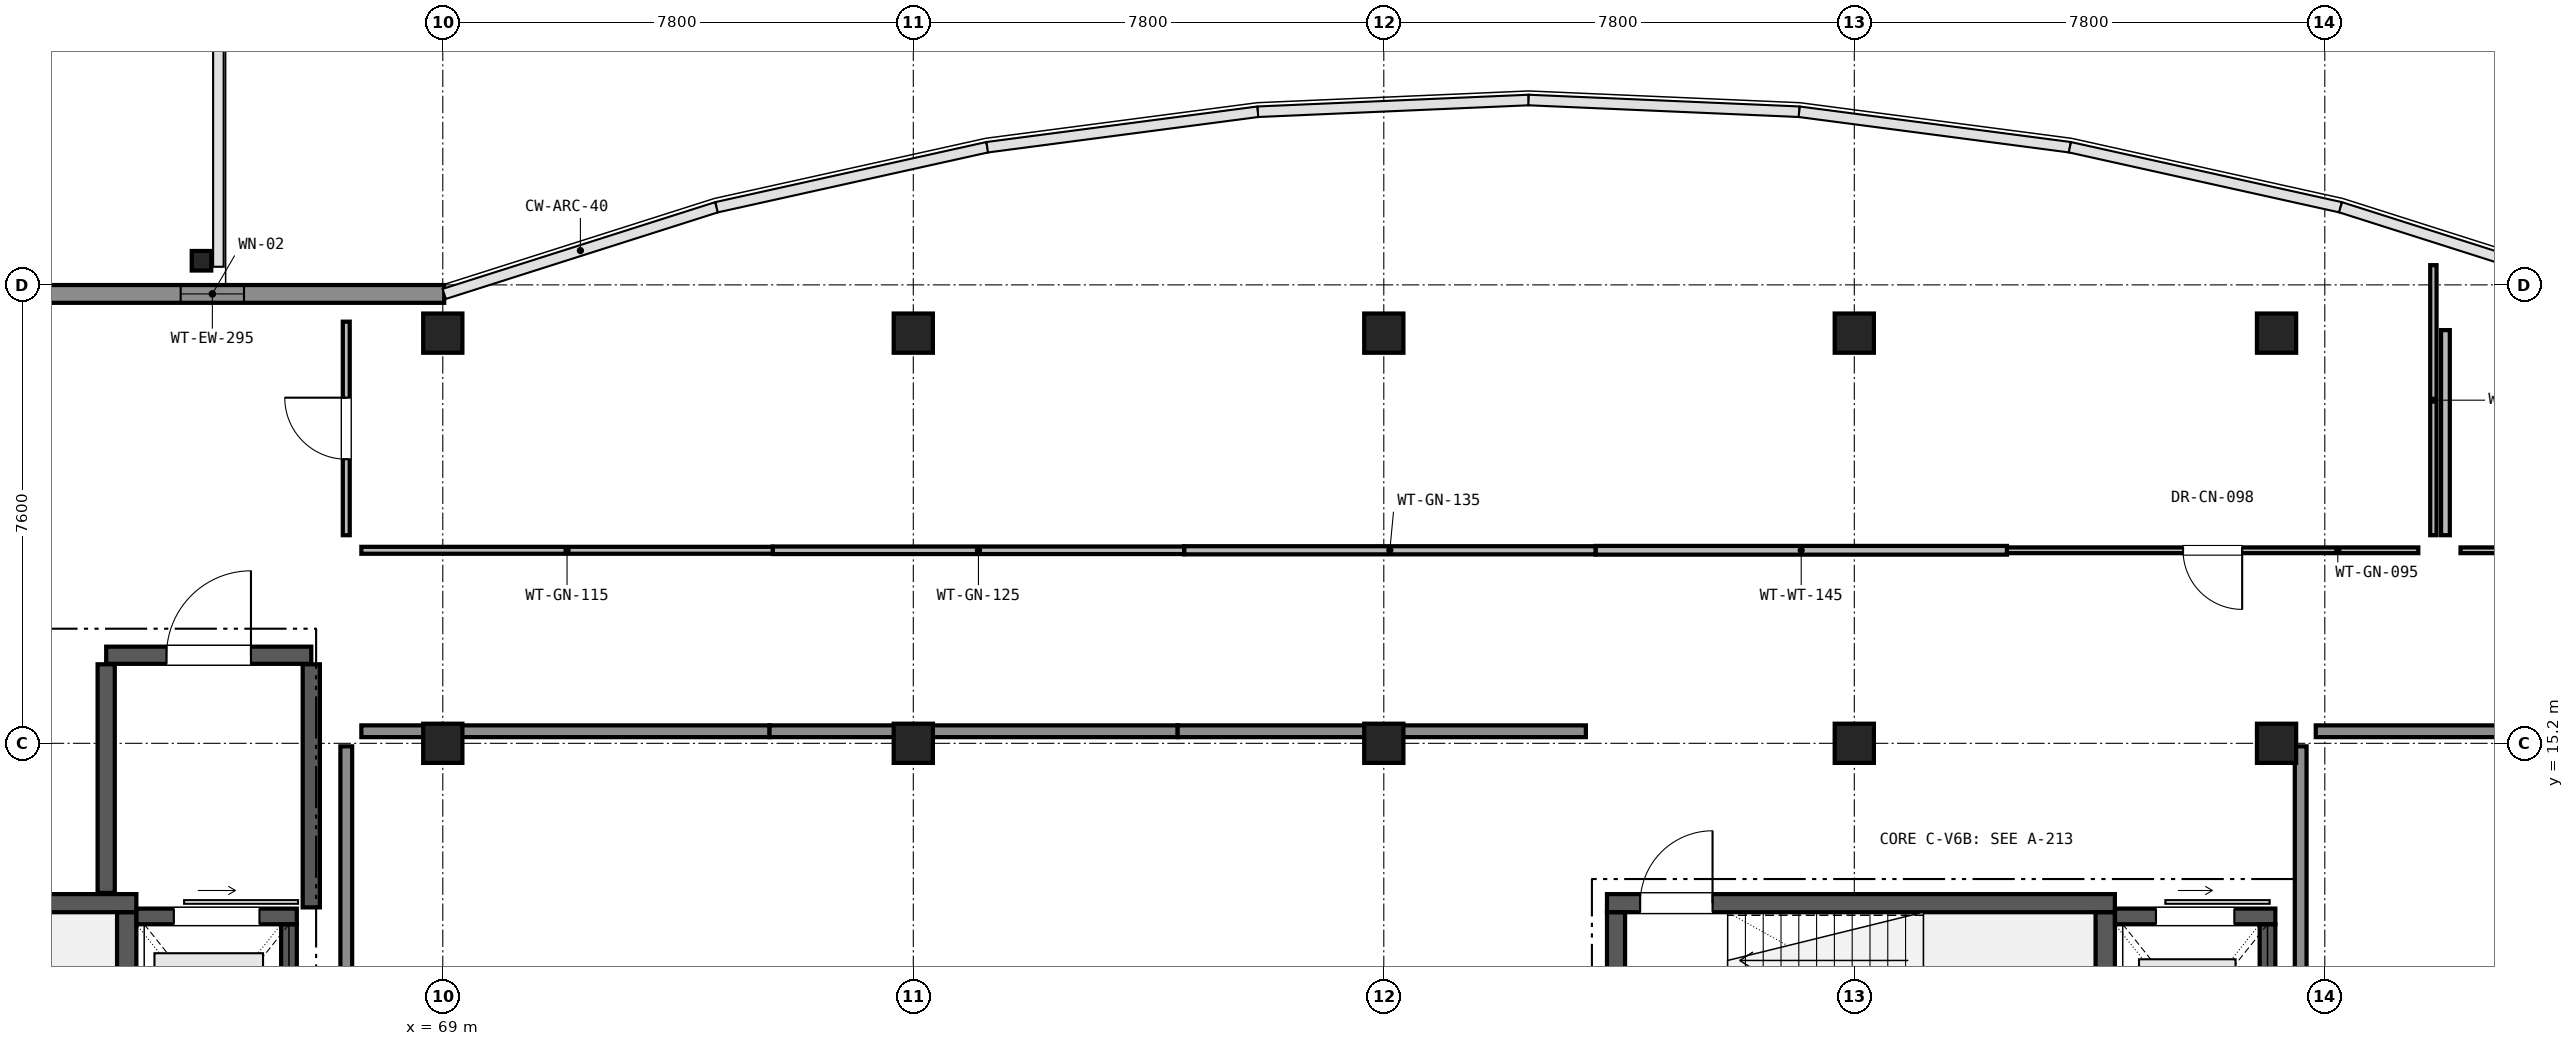
"""IFC4 building model, lengths in metres.
Left out: names, types, materials, properties, quantities, classifications, styles, units other than length and angle.
Written with IfcOpenShell. Run it as: python <this file> out.ifc"""

import sys

from ifc_helpers import new_model, si_unit, direction, frame, frame_2d, origin, origin_2d, place, context, subcontext, project, spatial, rectangle, hollow_circle, extrude, element, fill, save


model = new_model("IFC4")
c1 = context("Model", 3, precision=1e-05, world=origin(), true_north=direction((0.0, 1.0)))
c2 = subcontext(c1, "Body", "Model", "MODEL_VIEW")
j1 = project(units=[si_unit("LENGTHUNIT", "METRE"), si_unit("PLANEANGLEUNIT", "RADIAN")], contexts=[c1])
p1 = place(None, origin())
s1 = spatial("IfcSite", under=j1, at=p1, CompositionType="ELEMENT")
p2 = place(p1, origin())
s2 = spatial("IfcBuilding", under=s1, at=p2, CompositionType="ELEMENT")
p3 = place(p2, frame((0.0, 0.0, 9.52)))
s3 = spatial("IfcBuildingStorey", under=s2, at=p3, CompositionType="ELEMENT", Elevation=9.52)
for number, where, z_axis, x_axis in (
    (1, (69.0, 15.2, 0.0), (0.0, 0.0, 1.0), (1.0, 0.0, 0.0)),
    (2, (69.0, 22.0, 0.0), (0.0, 0.0, 1.0), (1.0, 0.0, 0.0)),
    (3, (76.8, 15.2, 0.0), (0.0, 0.0, 1.0), (1.0, 0.0, 0.0)),
    (4, (76.8, 22.0, 0.0), (0.0, 0.0, 1.0), (1.0, 0.0, 0.0)),
    (5, (84.6, 15.2, 0.0), (0.0, 0.0, 1.0), (1.0, 0.0, 0.0)),
    (6, (84.6, 22.0, 0.0), (0.0, 0.0, 1.0), (1.0, 0.0, 0.0)),
    (7, (92.4, 15.2, 0.0), (0.0, 0.0, 1.0), (1.0, 0.0, 0.0)),
    (8, (92.4, 22.0, 0.0), (0.0, 0.0, 1.0), (1.0, 0.0, 0.0)),
    (9, (99.4, 15.2, 0.0), (0.0, 0.0, 1.0), (1.0, 0.0, 0.0)),
    (10, (99.4, 22.0, 0.0), (0.0, 0.0, 1.0), (1.0, 0.0, 0.0)),
):
    element("IfcColumn", number, at=place(p3, frame(where, z_axis=z_axis, x_axis=x_axis)), inside=s3, PredefinedType="COLUMN", context=c2, shape_type="SweptSolid", body=[
        extrude(rectangle(XDim=0.65, YDim=0.65, at=origin_2d()), origin(), (0.0, 0.0, 1.0), 4.08),
    ])
p4 = place(p3, frame((65.0, 23.2, 0.0), z_axis=(0.0, 0.0, 1.0), x_axis=(1.0, 0.0, 0.0)))
e11 = element("IfcColumn", 11, at=p4, inside=s3, PredefinedType="COLUMN", context=c2, shape_type="SweptSolid", body=[
    extrude(hollow_circle(Radius=0.162, WallThickness=0.012, at=origin_2d()), origin(), (0.0, 0.0, 1.0), 4.08),
])
p5 = place(p3, frame((61.337, 22.65, 0.0), z_axis=(0.0, 0.0, 1.0), x_axis=(1.0, 0.0, 0.0)))
e12 = element("IfcWall", 12, at=p5, inside=s3, PredefinedType="SOLIDWALL", context=c2, shape_type="SweptSolid", body=[
    extrude(rectangle(XDim=7.687, YDim=0.295, at=frame_2d((3.843, 0.0))), origin(), (0.0, 0.0, 1.0), 3.78),
])
p6 = place(p5, frame((3.318, 0.0, 0.9)))
e13 = element("IfcOpeningElement", 13, at=p6, cuts=e12, PredefinedType="OPENING", context=c2, shape_type="SweptSolid", body=[
    extrude(rectangle(XDim=1.05, YDim=1.5, at=frame_2d((0.525, 0.75))), frame((0.0, 0.157, 0.0), z_axis=(0.0, -1.0, 0.0), x_axis=(1.0, 0.0, 0.0)), (0.0, 0.0, 1.0), 0.315),
])
p7 = place(p3, frame((55.5, 12.55, 0.0), z_axis=(0.0, 0.0, 1.0), x_axis=(1.0, 0.0, 0.0)))
e14 = element("IfcWall", 14, at=p7, inside=s3, PredefinedType="SHEAR", context=c2, shape_type="SweptSolid", body=[
    extrude(rectangle(XDim=8.42, YDim=0.3, at=frame_2d((4.21, 0.0))), origin(), (0.0, 0.0, 1.0), 3.78),
])
p8 = place(p7, frame((0.55, 0.0, 0.0)))
e15 = element("IfcOpeningElement", 15, at=p8, cuts=e14, PredefinedType="OPENING", context=c2, shape_type="SweptSolid", body=[
    extrude(rectangle(XDim=1.2, YDim=2.2, at=frame_2d((0.6, 1.1))), frame((0.0, 0.16, 0.0), z_axis=(0.0, -1.0, 0.0), x_axis=(1.0, 0.0, 0.0)), (0.0, 0.0, 1.0), 0.32),
])
p9 = place(p3, frame((63.76, 9.002, 0.0), z_axis=(0.0, 0.0, 1.0), x_axis=(0.0, 1.0, 0.0)))
e16 = element("IfcWall", 16, at=p9, inside=s3, PredefinedType="SHEAR", context=c2, shape_type="SweptSolid", body=[
    extrude(rectangle(XDim=3.396, YDim=0.32, at=frame_2d((1.698, 0.0))), origin(), (0.0, 0.0, 1.0), 3.78),
])
p10 = place(p3, frame((63.922, 12.33, 0.0), z_axis=(0.0, 0.0, 1.0), x_axis=(1.0, 0.0, 0.0)))
e17 = element("IfcWall", 17, at=p10, inside=s3, PredefinedType="SHEAR", context=c2, shape_type="SweptSolid", body=[
    extrude(rectangle(XDim=2.658, YDim=0.26, at=frame_2d((1.329, 0.0))), origin(), (0.0, 0.0, 1.0), 3.78),
])
p11 = place(p10, frame((0.619, 0.0, 0.0)))
e18 = element("IfcOpeningElement", 18, at=p11, cuts=e17, PredefinedType="OPENING", context=c2, shape_type="SweptSolid", body=[
    extrude(rectangle(XDim=1.42, YDim=2.25, at=frame_2d((0.71, 1.125))), frame((0.0, 0.14, 0.0), z_axis=(0.0, -1.0, 0.0), x_axis=(1.0, 0.0, 0.0)), (0.0, 0.0, 1.0), 0.28),
])
p12 = place(p3, frame((66.45, 9.202, 0.0), z_axis=(0.0, 0.0, 1.0), x_axis=(0.0, 1.0, 0.0)))
e19 = element("IfcWall", 19, at=p12, inside=s3, PredefinedType="SHEAR", context=c2, shape_type="SweptSolid", body=[
    extrude(rectangle(XDim=2.996, YDim=0.26, at=frame_2d((1.498, 0.0))), origin(), (0.0, 0.0, 1.0), 3.78),
])
p13 = place(p3, frame((63.42, 16.66, 0.0), z_axis=(0.0, 0.0, 1.0), x_axis=(1.0, 0.0, 0.0)))
e20 = element("IfcWall", 20, at=p13, inside=s3, PredefinedType="SHEAR", context=c2, shape_type="SweptSolid", body=[
    extrude(rectangle(XDim=3.4, YDim=0.285, at=frame_2d((1.7, 0.0))), origin(), (0.0, 0.0, 1.0), 3.78),
])
p14 = place(p13, frame((1.0, 0.0, 0.0)))
e21 = element("IfcOpeningElement", 21, at=p14, cuts=e20, PredefinedType="OPENING", context=c2, shape_type="SweptSolid", body=[
    extrude(rectangle(XDim=1.4, YDim=2.25, at=frame_2d((0.7, 1.125))), frame((0.0, 0.152, 0.0), z_axis=(0.0, -1.0, 0.0), x_axis=(1.0, 0.0, 0.0)), (0.0, 0.0, 1.0), 0.305),
])
p15 = place(p3, frame((63.42, 12.72, 0.0), z_axis=(0.0, 0.0, 1.0), x_axis=(0.0, 1.0, 0.0)))
e22 = element("IfcWall", 22, at=p15, inside=s3, PredefinedType="SHEAR", context=c2, shape_type="SweptSolid", body=[
    extrude(rectangle(XDim=3.79, YDim=0.285, at=frame_2d((1.895, 0.0))), origin(), (0.0, 0.0, 1.0), 3.03),
])
p16 = place(p3, frame((66.82, 12.48, 0.0), z_axis=(0.0, 0.0, 1.0), x_axis=(0.0, 1.0, 0.0)))
e23 = element("IfcWall", 23, at=p16, inside=s3, PredefinedType="SHEAR", context=c2, shape_type="SweptSolid", body=[
    extrude(rectangle(XDim=4.03, YDim=0.285, at=frame_2d((2.015, 0.0))), origin(), (0.0, 0.0, 1.0), 3.03),
])
p17 = place(p3, frame((88.3, 12.55, 0.0), z_axis=(0.0, 0.0, 1.0), x_axis=(1.0, 0.0, 0.0)))
e24 = element("IfcWall", 24, at=p17, inside=s3, PredefinedType="SHEAR", context=c2, shape_type="SweptSolid", body=[
    extrude(rectangle(XDim=8.42, YDim=0.3, at=frame_2d((4.21, 0.0))), origin(), (0.0, 0.0, 1.0), 3.78),
])
p18 = place(p17, frame((0.55, 0.0, 0.0)))
e25 = element("IfcOpeningElement", 25, at=p18, cuts=e24, PredefinedType="OPENING", context=c2, shape_type="SweptSolid", body=[
    extrude(rectangle(XDim=1.2, YDim=2.2, at=frame_2d((0.6, 1.1))), frame((0.0, 0.16, 0.0), z_axis=(0.0, -1.0, 0.0), x_axis=(1.0, 0.0, 0.0)), (0.0, 0.0, 1.0), 0.32),
])
p19 = place(p3, frame((88.45, 9.002, 0.0), z_axis=(0.0, 0.0, 1.0), x_axis=(0.0, 1.0, 0.0)))
e26 = element("IfcWall", 26, at=p19, inside=s3, PredefinedType="SHEAR", context=c2, shape_type="SweptSolid", body=[
    extrude(rectangle(XDim=3.396, YDim=0.3, at=frame_2d((1.698, 0.0))), origin(), (0.0, 0.0, 1.0), 3.78),
])
p20 = place(p3, frame((96.56, 9.002, 0.0), z_axis=(0.0, 0.0, 1.0), x_axis=(0.0, 1.0, 0.0)))
e27 = element("IfcWall", 27, at=p20, inside=s3, PredefinedType="SHEAR", context=c2, shape_type="SweptSolid", body=[
    extrude(rectangle(XDim=3.396, YDim=0.32, at=frame_2d((1.698, 0.0))), origin(), (0.0, 0.0, 1.0), 3.78),
])
p21 = place(p3, frame((96.722, 12.33, 0.0), z_axis=(0.0, 0.0, 1.0), x_axis=(1.0, 0.0, 0.0)))
e28 = element("IfcWall", 28, at=p21, inside=s3, PredefinedType="SHEAR", context=c2, shape_type="SweptSolid", body=[
    extrude(rectangle(XDim=2.658, YDim=0.26, at=frame_2d((1.329, 0.0))), origin(), (0.0, 0.0, 1.0), 3.78),
])
p22 = place(p21, frame((0.679, 0.0, 0.0)))
e29 = element("IfcOpeningElement", 29, at=p22, cuts=e28, PredefinedType="OPENING", context=c2, shape_type="SweptSolid", body=[
    extrude(rectangle(XDim=1.3, YDim=2.2, at=frame_2d((0.65, 1.1))), frame((0.0, 0.14, 0.0), z_axis=(0.0, -1.0, 0.0), x_axis=(1.0, 0.0, 0.0)), (0.0, 0.0, 1.0), 0.28),
])
p23 = place(p3, frame((99.25, 9.202, 0.0), z_axis=(0.0, 0.0, 1.0), x_axis=(0.0, 1.0, 0.0)))
e30 = element("IfcWall", 30, at=p23, inside=s3, PredefinedType="SHEAR", context=c2, shape_type="SweptSolid", body=[
    extrude(rectangle(XDim=2.996, YDim=0.26, at=frame_2d((1.498, 0.0))), origin(), (0.0, 0.0, 1.0), 3.78),
])
p24 = place(p3, frame((67.4, 8.0, 0.0), z_axis=(0.0, 0.0, 1.0), x_axis=(0.0, 1.0, 0.0)))
e31 = element("IfcWall", 31, at=p24, inside=s3, PredefinedType="PARTITIONING", context=c2, shape_type="SweptSolid", body=[
    extrude(rectangle(XDim=7.15, YDim=0.195, at=frame_2d((3.575, 0.0))), origin(), (0.0, 0.0, 1.0), 3.03),
])
p25 = place(p3, frame((67.65, 15.4, 0.0), z_axis=(0.0, 0.0, 1.0), x_axis=(1.0, 0.0, 0.0)))
e32 = element("IfcWall", 32, at=p25, inside=s3, PredefinedType="PARTITIONING", context=c2, shape_type="SweptSolid", body=[
    extrude(rectangle(XDim=6.767, YDim=0.195, at=frame_2d((3.384, 0.0))), origin(), (0.0, 0.0, 1.0), 2.98),
])
p26 = place(p3, frame((74.417, 15.4, 0.0), z_axis=(0.0, 0.0, 1.0), x_axis=(1.0, 0.0, 0.0)))
e33 = element("IfcWall", 33, at=p26, inside=s3, PredefinedType="PARTITIONING", context=c2, shape_type="SweptSolid", body=[
    extrude(rectangle(XDim=6.766, YDim=0.195, at=frame_2d((3.383, 0.0))), origin(), (0.0, 0.0, 1.0), 2.98),
])
p27 = place(p3, frame((81.183, 15.4, 0.0), z_axis=(0.0, 0.0, 1.0), x_axis=(1.0, 0.0, 0.0)))
e34 = element("IfcWall", 34, at=p27, inside=s3, PredefinedType="PARTITIONING", context=c2, shape_type="SweptSolid", body=[
    extrude(rectangle(XDim=6.767, YDim=0.195, at=frame_2d((3.383, 0.0))), origin(), (0.0, 0.0, 1.0), 3.03),
])
p28 = place(p3, frame((100.05, 15.4, 0.0), z_axis=(0.0, 0.0, 1.0), x_axis=(1.0, 0.0, 0.0)))
e35 = element("IfcWall", 35, at=p28, inside=s3, PredefinedType="PARTITIONING", context=c2, shape_type="SweptSolid", body=[
    extrude(rectangle(XDim=7.45, YDim=0.195, at=frame_2d((3.725, 0.0))), origin(), (0.0, 0.0, 1.0), 2.98),
])
p29 = place(p28, frame((3.0, 0.0, 0.0)))
e36 = element("IfcOpeningElement", 36, at=p29, cuts=e35, PredefinedType="OPENING", context=c2, shape_type="SweptSolid", body=[
    extrude(rectangle(XDim=1.45, YDim=2.25, at=frame_2d((0.725, 1.125))), frame((0.0, 0.107, 0.0), z_axis=(0.0, -1.0, 0.0), x_axis=(1.0, 0.0, 0.0)), (0.0, 0.0, 1.0), 0.215),
])
p30 = place(p3, frame((99.8, 8.0, 0.0), z_axis=(0.0, 0.0, 1.0), x_axis=(0.0, 1.0, 0.0)))
e37 = element("IfcWall", 37, at=p30, inside=s3, PredefinedType="PARTITIONING", context=c2, shape_type="SweptSolid", body=[
    extrude(rectangle(XDim=7.15, YDim=0.195, at=frame_2d((3.575, 0.0))), origin(), (0.0, 0.0, 1.0), 3.08),
])
p31 = place(p3, frame((67.4, 18.65, 0.0), z_axis=(0.0, 0.0, 1.0), x_axis=(0.0, 1.0, 0.0)))
e38 = element("IfcWall", 38, at=p31, inside=s3, PredefinedType="PARTITIONING", context=c2, shape_type="SweptSolid", body=[
    extrude(rectangle(XDim=3.54, YDim=0.115, at=frame_2d((1.77, 0.0))), origin(), (0.0, 0.0, 1.0), 3.23),
])
p32 = place(p31, frame((1.26, 0.0, 0.0)))
e39 = element("IfcOpeningElement", 39, at=p32, cuts=e38, PredefinedType="OPENING", context=c2, shape_type="SweptSolid", body=[
    extrude(rectangle(XDim=1.02, YDim=2.15, at=frame_2d((0.51, 1.075))), frame((0.0, 0.067, 0.0), z_axis=(0.0, -1.0, 0.0), x_axis=(1.0, 0.0, 0.0)), (0.0, 0.0, 1.0), 0.135),
])
p33 = place(p3, frame((102.0, 23.127, 0.0), z_axis=(0.0, 0.0, 1.0), x_axis=(0.0, -1.0, 0.0)))
e40 = element("IfcWall", 40, at=p33, inside=s3, PredefinedType="PARTITIONING", context=c2, shape_type="SweptSolid", body=[
    extrude(rectangle(XDim=4.477, YDim=0.105, at=frame_2d((2.239, 0.0))), origin(), (0.0, 0.0, 1.0), 2.98),
])
p34 = place(p3, frame((101.75, 18.4, 0.0), z_axis=(0.0, 0.0, 1.0), x_axis=(-1.0, 0.0, 0.0)))
e41 = element("IfcWall", 41, at=p34, inside=s3, PredefinedType="PARTITIONING", context=c2, shape_type="SweptSolid", body=[
    extrude(rectangle(XDim=6.82, YDim=0.095, at=frame_2d((3.41, 0.0))), origin(), (0.0, 0.0, 1.0), 3.13),
])
p35 = place(p34, frame((2.92, 0.0, 0.0)))
e42 = element("IfcOpeningElement", 42, at=p35, cuts=e41, PredefinedType="OPENING", context=c2, shape_type="SweptSolid", body=[
    extrude(rectangle(XDim=0.98, YDim=2.15, at=frame_2d((0.49, 1.075))), frame((0.0, 0.057, 0.0), z_axis=(0.0, -1.0, 0.0), x_axis=(1.0, 0.0, 0.0)), (0.0, 0.0, 1.0), 0.115),
])
p36 = place(p3, frame((94.93, 18.4, 0.0), z_axis=(0.0, 0.0, 1.0), x_axis=(-1.0, 0.0, 0.0)))
e43 = element("IfcWall", 43, at=p36, inside=s3, PredefinedType="PARTITIONING", context=c2, shape_type="SweptSolid", body=[
    extrude(rectangle(XDim=6.82, YDim=0.145, at=frame_2d((3.41, 0.0))), origin(), (0.0, 0.0, 1.0), 3.23),
])
p37 = place(p3, frame((88.11, 18.4, 0.0), z_axis=(0.0, 0.0, 1.0), x_axis=(-1.0, 0.0, 0.0)))
e44 = element("IfcWall", 44, at=p37, inside=s3, PredefinedType="PARTITIONING", context=c2, shape_type="SweptSolid", body=[
    extrude(rectangle(XDim=6.82, YDim=0.135, at=frame_2d((3.41, 0.0))), origin(), (0.0, 0.0, 1.0), 3.03),
])
p38 = place(p3, frame((81.29, 18.4, 0.0), z_axis=(0.0, 0.0, 1.0), x_axis=(-1.0, 0.0, 0.0)))
e45 = element("IfcWall", 45, at=p38, inside=s3, PredefinedType="PARTITIONING", context=c2, shape_type="SweptSolid", body=[
    extrude(rectangle(XDim=6.82, YDim=0.125, at=frame_2d((3.41, 0.0))), origin(), (0.0, 0.0, 1.0), 3.18),
])
p39 = place(p3, frame((74.47, 18.4, 0.0), z_axis=(0.0, 0.0, 1.0), x_axis=(-1.0, 0.0, 0.0)))
e46 = element("IfcWall", 46, at=p39, inside=s3, PredefinedType="PARTITIONING", context=c2, shape_type="SweptSolid", body=[
    extrude(rectangle(XDim=6.82, YDim=0.115, at=frame_2d((3.41, 0.0))), origin(), (0.0, 0.0, 1.0), 3.03),
])
p40 = place(p3, frame((108.7, 18.4, 0.0), z_axis=(0.0, 0.0, 1.0), x_axis=(-1.0, 0.0, 0.0)))
e47 = element("IfcWall", 47, at=p40, inside=s3, PredefinedType="PARTITIONING", context=c2, shape_type="SweptSolid", body=[
    extrude(rectangle(XDim=6.25, YDim=0.095, at=frame_2d((3.125, 0.0))), origin(), (0.0, 0.0, 1.0), 2.98),
])
p41 = place(p3, frame((102.2, 18.65, 0.0), z_axis=(0.0, 0.0, 1.0), x_axis=(0.0, 1.0, 0.0)))
e48 = element("IfcWall", 48, at=p41, inside=s3, PredefinedType="PARTITIONING", context=c2, shape_type="SweptSolid", body=[
    extrude(rectangle(XDim=3.4, YDim=0.145, at=frame_2d((1.7, 0.0))), origin(), (0.0, 0.0, 1.0), 2.98),
])
p42 = place(p6, origin())
e49 = element("IfcWindow", 49, at=p42, inside=s3, PartitioningType="SINGLE_PANEL", PredefinedType="WINDOW", context=c2, shape_type="SweptSolid", body=[
    extrude(rectangle(XDim=1.05, YDim=1.5, at=frame_2d((0.525, 0.75))), frame((0.0, 0.03, 0.0), z_axis=(0.0, -1.0, 0.0), x_axis=(1.0, 0.0, 0.0)), (0.0, 0.0, 1.0), 0.06),
])
fill(e13, e49)
p43 = place(p11, origin())
e50 = element("IfcDoor", 50, at=p43, inside=s3, OperationType="SLIDING_TO_RIGHT", PredefinedType="DOOR", context=c2, shape_type="SweptSolid", body=[
    extrude(rectangle(XDim=1.42, YDim=2.25, at=frame_2d((0.71, 1.125))), frame((0.0, 0.025, 0.0), z_axis=(0.0, -1.0, 0.0), x_axis=(1.0, 0.0, 0.0)), (0.0, 0.0, 1.0), 0.05),
])
fill(e18, e50)
p44 = place(p14, origin())
e51 = element("IfcDoor", 51, at=p44, inside=s3, OperationType="SINGLE_SWING_RIGHT", PredefinedType="DOOR", context=c2, shape_type="SweptSolid", body=[
    extrude(rectangle(XDim=1.4, YDim=2.25, at=frame_2d((0.7, 1.125))), frame((0.0, 0.025, 0.0), z_axis=(0.0, -1.0, 0.0), x_axis=(1.0, 0.0, 0.0)), (0.0, 0.0, 1.0), 0.05),
])
fill(e21, e51)
p45 = place(p18, origin())
e52 = element("IfcDoor", 52, at=p45, inside=s3, OperationType="SINGLE_SWING_RIGHT", PredefinedType="DOOR", context=c2, shape_type="SweptSolid", body=[
    extrude(rectangle(XDim=1.2, YDim=2.2, at=frame_2d((0.6, 1.1))), frame((0.0, 0.025, 0.0), z_axis=(0.0, -1.0, 0.0), x_axis=(1.0, 0.0, 0.0)), (0.0, 0.0, 1.0), 0.05),
])
fill(e25, e52)
p46 = place(p22, origin())
e53 = element("IfcDoor", 53, at=p46, inside=s3, OperationType="SLIDING_TO_RIGHT", PredefinedType="DOOR", context=c2, shape_type="SweptSolid", body=[
    extrude(rectangle(XDim=1.3, YDim=2.2, at=frame_2d((0.65, 1.1))), frame((0.0, 0.025, 0.0), z_axis=(0.0, -1.0, 0.0), x_axis=(1.0, 0.0, 0.0)), (0.0, 0.0, 1.0), 0.05),
])
fill(e29, e53)
p47 = place(p32, origin())
e54 = element("IfcDoor", 54, at=p47, inside=s3, OperationType="SINGLE_SWING_RIGHT", PredefinedType="DOOR", context=c2, shape_type="SweptSolid", body=[
    extrude(rectangle(XDim=1.02, YDim=2.15, at=frame_2d((0.51, 1.075))), frame((0.0, 0.025, 0.0), z_axis=(0.0, -1.0, 0.0), x_axis=(1.0, 0.0, 0.0)), (0.0, 0.0, 1.0), 0.05),
])
fill(e39, e54)
p48 = place(p35, origin())
e55 = element("IfcDoor", 55, at=p48, inside=s3, OperationType="SINGLE_SWING_LEFT", PredefinedType="DOOR", context=c2, shape_type="SweptSolid", body=[
    extrude(rectangle(XDim=0.98, YDim=2.15, at=frame_2d((0.49, 1.075))), frame((0.0, 0.025, 0.0), z_axis=(0.0, -1.0, 0.0), x_axis=(1.0, 0.0, 0.0)), (0.0, 0.0, 1.0), 0.05),
])
fill(e42, e55)
save(model, sys.argv[1])
